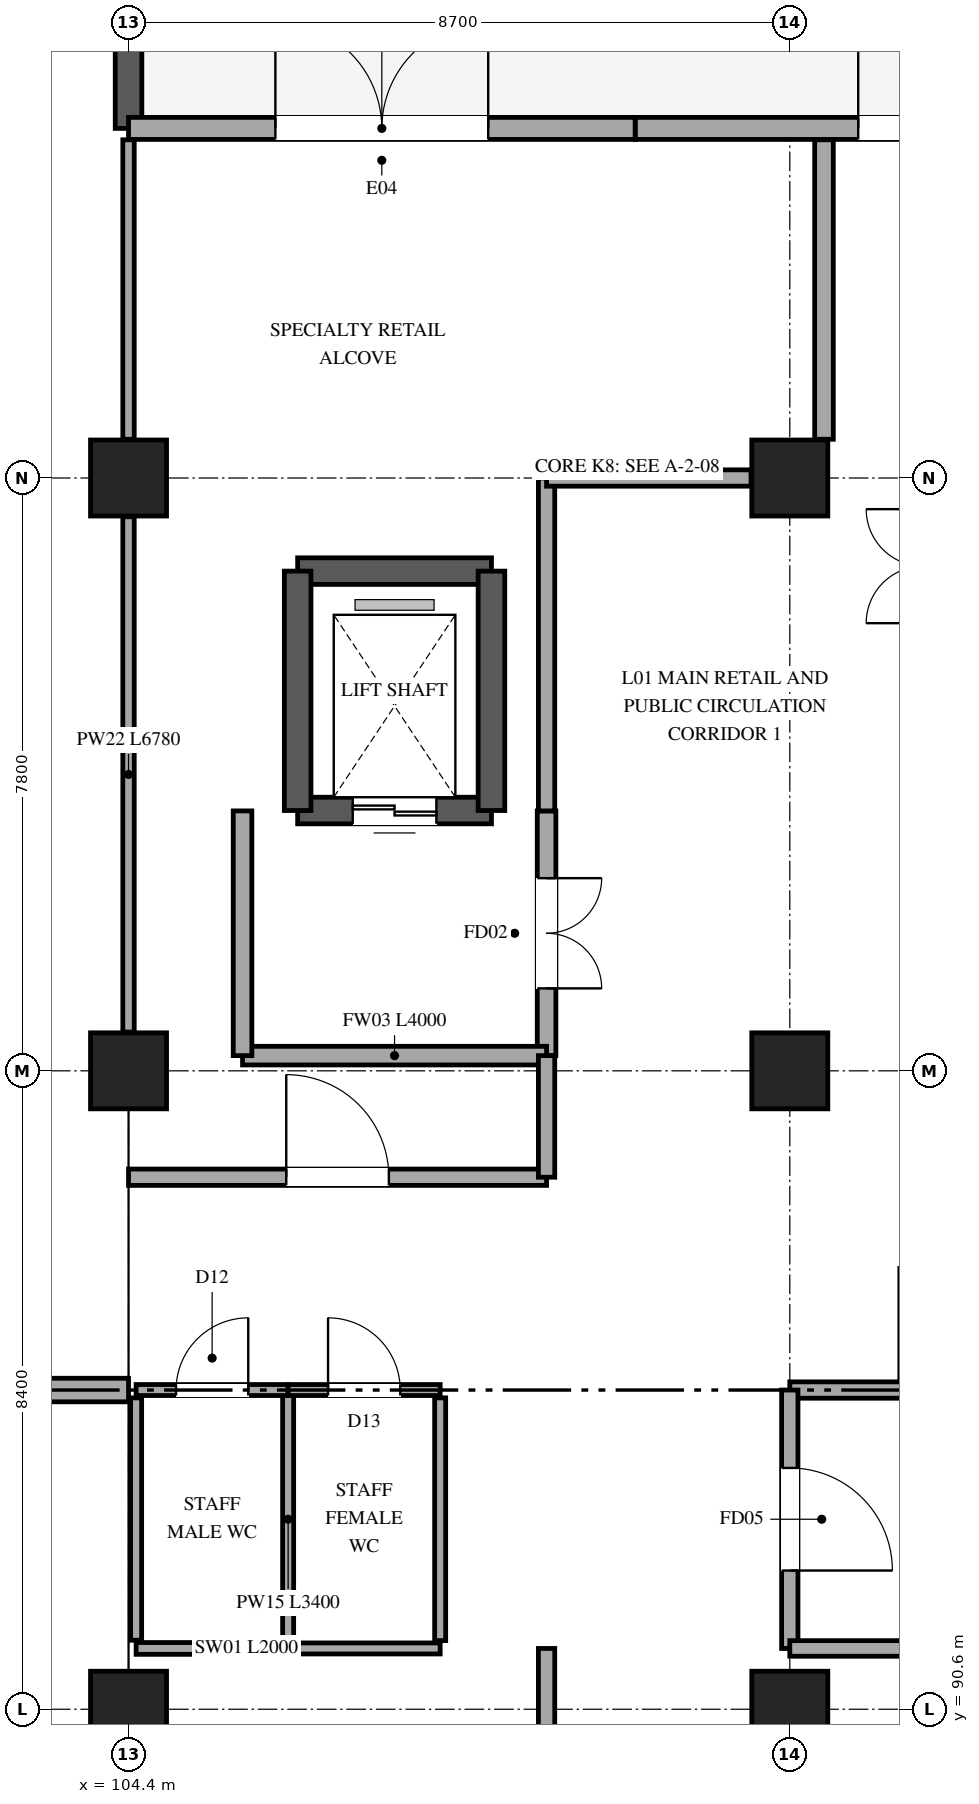
"""IFC4 building model, lengths in metres.
Left out: names, types, materials, properties, quantities, classifications, styles, units other than length and angle.
Written with IfcOpenShell. Run it as: python <this file> out.ifc"""

import sys

from ifc_helpers import new_model, si_unit, direction, frame, frame_2d, origin, origin_2d, place, context, subcontext, project, spatial, rectangle, extrude, element, fill, save


model = new_model("IFC4")
c1 = context("Model", 3, precision=1e-05, world=origin(), true_north=direction((0.0, 1.0)))
c2 = subcontext(c1, "Body", "Model", "MODEL_VIEW")
j1 = project(units=[si_unit("LENGTHUNIT", "METRE"), si_unit("PLANEANGLEUNIT", "RADIAN")], contexts=[c1])
p1 = place(None, origin())
s1 = spatial("IfcSite", under=j1, at=p1, CompositionType="ELEMENT")
p2 = place(p1, origin())
s2 = spatial("IfcBuilding", under=s1, at=p2, CompositionType="ELEMENT")
p3 = place(p2, origin())
s3 = spatial("IfcBuildingStorey", under=s2, at=p3, CompositionType="ELEMENT", Elevation=0.0)
for number, where, z_axis, x_axis in (
    (1, (104.4, 90.6, 0.0), (0.0, 0.0, 1.0), (1.0, 0.0, 0.0)),
    (2, (104.4, 99.0, 0.0), (0.0, 0.0, 1.0), (1.0, 0.0, 0.0)),
    (3, (104.4, 106.8, 0.0), (0.0, 0.0, 1.0), (1.0, 0.0, 0.0)),
    (4, (113.1, 90.6, 0.0), (0.0, 0.0, 1.0), (1.0, 0.0, 0.0)),
    (5, (113.1, 99.0, 0.0), (0.0, 0.0, 1.0), (1.0, 0.0, 0.0)),
    (6, (113.1, 106.8, 0.0), (0.0, 0.0, 1.0), (1.0, 0.0, 0.0)),
):
    element("IfcColumn", number, at=place(p3, frame(where, z_axis=z_axis, x_axis=x_axis)), inside=s3, PredefinedType="COLUMN", context=c2, shape_type="SweptSolid", body=[
        extrude(rectangle(XDim=1.0, YDim=1.0, at=origin_2d()), origin(), (0.0, 0.0, 1.0), 6.0),
    ])
p4 = place(p3, frame((104.4, 114.148, 0.0), z_axis=(0.0, 0.0, 1.0), x_axis=(0.0, -1.0, 0.0)))
e7 = element("IfcWall", 7, at=p4, inside=s3, PredefinedType="STANDARD", context=c2, shape_type="SweptSolid", body=[
    extrude(rectangle(XDim=2.748, YDim=0.35, at=frame_2d((1.374, 0.0))), origin(), (0.0, 0.0, 1.0), 5.66),
])
p5 = place(p3, frame((104.4, 111.4, 0.0), z_axis=(0.0, 0.0, 1.0), x_axis=(1.0, 0.0, 0.0)))
e8 = element("IfcWall", 8, at=p5, inside=s3, PredefinedType="STANDARD", context=c2, shape_type="SweptSolid", body=[
    extrude(rectangle(XDim=6.665, YDim=0.29, at=frame_2d((3.333, 0.0))), origin(), (0.0, 0.0, 1.0), 4.875),
])
p6 = place(p5, frame((1.932, 0.0, 0.0)))
e9 = element("IfcOpeningElement", 9, at=p6, cuts=e8, PredefinedType="OPENING", context=c2, shape_type="SweptSolid", body=[
    extrude(rectangle(XDim=2.8, YDim=2.5, at=frame_2d((1.4, 1.25))), frame((0.0, 0.155, 0.0), z_axis=(0.0, -1.0, 0.0), x_axis=(1.0, 0.0, 0.0)), (0.0, 0.0, 1.0), 0.31),
])
p7 = place(p3, frame((111.069, 111.4, 0.0), z_axis=(0.0, 0.0, 1.0), x_axis=(1.0, 0.0, 0.0)))
e10 = element("IfcWall", 10, at=p7, inside=s3, PredefinedType="STANDARD", context=c2, shape_type="SweptSolid", body=[
    extrude(rectangle(XDim=6.662, YDim=0.29, at=frame_2d((3.331, 0.0))), origin(), (0.0, 0.0, 1.0), 4.92),
])
p8 = place(p7, frame((2.931, 0.0, 0.0)))
e11 = element("IfcOpeningElement", 11, at=p8, cuts=e10, PredefinedType="OPENING", context=c2, shape_type="SweptSolid", body=[
    extrude(rectangle(XDim=3.2, YDim=2.4, at=frame_2d((1.6, 1.2))), frame((0.0, 0.155, 0.0), z_axis=(0.0, -1.0, 0.0), x_axis=(1.0, 0.0, 0.0)), (0.0, 0.0, 1.0), 0.31),
])
p9 = place(p3, frame((106.625, 105.575, 0.0), z_axis=(0.0, 0.0, 1.0), x_axis=(1.0, 0.0, 0.0)))
e12 = element("IfcWall", 12, at=p9, inside=s3, PredefinedType="SHEAR", context=c2, shape_type="SweptSolid", body=[
    extrude(rectangle(XDim=2.55, YDim=0.35, at=frame_2d((1.275, 0.0))), origin(), (0.0, 0.0, 1.0), 6.0),
])
p10 = place(p3, frame((109.175, 102.425, 0.0), z_axis=(0.0, 0.0, 1.0), x_axis=(-1.0, 0.0, 0.0)))
e13 = element("IfcWall", 13, at=p10, inside=s3, PredefinedType="SHEAR", context=c2, shape_type="SweptSolid", body=[
    extrude(rectangle(XDim=2.55, YDim=0.35, at=frame_2d((1.275, 0.0))), origin(), (0.0, 0.0, 1.0), 6.0),
])
p11 = place(p10, frame((0.725, 0.0, 0.0)))
e14 = element("IfcOpeningElement", 14, at=p11, cuts=e13, PredefinedType="OPENING", context=c2, shape_type="SweptSolid", body=[
    extrude(rectangle(XDim=1.1, YDim=2.2, at=frame_2d((0.55, 1.1))), frame((0.0, 0.185, 0.0), z_axis=(0.0, -1.0, 0.0), x_axis=(1.0, 0.0, 0.0)), (0.0, 0.0, 1.0), 0.37),
])
for number, where, z_axis, x_axis in (
    (15, (106.625, 102.425, 0.0), (0.0, 0.0, 1.0), (0.0, 1.0, 0.0)),
    (16, (109.175, 105.575, 0.0), (0.0, 0.0, 1.0), (0.0, -1.0, 0.0)),
):
    element("IfcWall", number, at=place(p3, frame(where, z_axis=z_axis, x_axis=x_axis)), inside=s3, PredefinedType="SHEAR", context=c2, shape_type="SweptSolid", body=[
        extrude(rectangle(XDim=3.15, YDim=0.35, at=frame_2d((1.575, 0.0))), origin(), (0.0, 0.0, 1.0), 6.0),
    ])
p12 = place(p3, frame((109.9, 102.42, 0.0), z_axis=(0.0, 0.0, 1.0), x_axis=(0.0, -1.0, 0.0)))
e17 = element("IfcWall", 17, at=p12, inside=s3, PredefinedType="STANDARD", context=c2, shape_type="SweptSolid", body=[
    extrude(rectangle(XDim=3.22, YDim=0.245, at=frame_2d((1.61, 0.0))), origin(), (0.0, 0.0, 1.0), 4.925),
])
p13 = place(p12, frame((0.885, 0.0, 0.0)))
e18 = element("IfcOpeningElement", 18, at=p13, cuts=e17, PredefinedType="OPENING", context=c2, shape_type="SweptSolid", body=[
    extrude(rectangle(XDim=1.45, YDim=2.2, at=frame_2d((0.725, 1.1))), frame((0.0, 0.133, 0.0), z_axis=(0.0, -1.0, 0.0), x_axis=(1.0, 0.0, 0.0)), (0.0, 0.0, 1.0), 0.265),
])
p14 = place(p3, frame((109.9, 99.2, 0.0), z_axis=(0.0, 0.0, 1.0), x_axis=(-1.0, 0.0, 0.0)))
e19 = element("IfcWall", 19, at=p14, inside=s3, PredefinedType="STANDARD", context=c2, shape_type="SweptSolid", body=[
    extrude(rectangle(XDim=4.0, YDim=0.245, at=frame_2d((2.0, 0.0))), origin(), (0.0, 0.0, 1.0), 4.925),
])
p15 = place(p3, frame((105.9, 99.2, 0.0), z_axis=(0.0, 0.0, 1.0), x_axis=(0.0, 1.0, 0.0)))
e20 = element("IfcWall", 20, at=p15, inside=s3, PredefinedType="STANDARD", context=c2, shape_type="SweptSolid", body=[
    extrude(rectangle(XDim=3.22, YDim=0.245, at=frame_2d((1.61, 0.0))), origin(), (0.0, 0.0, 1.0), 4.925),
])
p16 = place(p3, frame((113.55, 107.31, 0.0), z_axis=(0.0, 0.0, 1.0), x_axis=(0.0, 1.0, 0.0)))
e21 = element("IfcWall", 21, at=p16, inside=s3, PredefinedType="STANDARD", context=c2, shape_type="SweptSolid", body=[
    extrude(rectangle(XDim=3.94, YDim=0.245, at=frame_2d((1.97, 0.0))), origin(), (0.0, 0.0, 1.0), 5.66),
])
p17 = place(p3, frame((106.5, 94.8, 0.0), z_axis=(0.0, 0.0, 1.0), x_axis=(0.0, -1.0, 0.0)))
e22 = element("IfcWall", 22, at=p17, inside=s3, PredefinedType="PARTITIONING", context=c2, shape_type="SweptSolid", body=[
    extrude(rectangle(XDim=3.4, YDim=0.145, at=frame_2d((1.7, 0.0))), origin(), (0.0, 0.0, 1.0), 5.66),
])
p18 = place(p3, frame((104.5, 94.8, 0.0), z_axis=(0.0, 0.0, 1.0), x_axis=(1.0, 0.0, 0.0)))
e23 = element("IfcWall", 23, at=p18, inside=s3, PredefinedType="PARTITIONING", context=c2, shape_type="SweptSolid", body=[
    extrude(rectangle(XDim=2.0, YDim=0.145, at=frame_2d((1.0, 0.0))), origin(), (0.0, 0.0, 1.0), 4.88),
])
p19 = place(p18, frame((0.525, 0.0, 0.0)))
e24 = element("IfcOpeningElement", 24, at=p19, cuts=e23, PredefinedType="OPENING", context=c2, shape_type="SweptSolid", body=[
    extrude(rectangle(XDim=0.95, YDim=2.15, at=frame_2d((0.475, 1.075))), frame((0.0, 0.083, 0.0), z_axis=(0.0, -1.0, 0.0), x_axis=(1.0, 0.0, 0.0)), (0.0, 0.0, 1.0), 0.165),
])
p20 = place(p3, frame((106.5, 91.4, 0.0), z_axis=(0.0, 0.0, 1.0), x_axis=(-1.0, 0.0, 0.0)))
e25 = element("IfcWall", 25, at=p20, inside=s3, PredefinedType="MOVABLE", context=c2, shape_type="SweptSolid", body=[
    extrude(rectangle(XDim=2.0, YDim=0.155, at=frame_2d((1.0, 0.0))), origin(), (0.0, 0.0, 1.0), 4.88),
])
p21 = place(p3, frame((106.5, 94.8, 0.0), z_axis=(0.0, 0.0, 1.0), x_axis=(1.0, 0.0, 0.0)))
e26 = element("IfcWall", 26, at=p21, inside=s3, PredefinedType="PARTITIONING", context=c2, shape_type="SweptSolid", body=[
    extrude(rectangle(XDim=2.0, YDim=0.145, at=frame_2d((1.0, 0.0))), origin(), (0.0, 0.0, 1.0), 5.66),
])
p22 = place(p21, frame((0.525, 0.0, 0.0)))
e27 = element("IfcOpeningElement", 27, at=p22, cuts=e26, PredefinedType="OPENING", context=c2, shape_type="SweptSolid", body=[
    extrude(rectangle(XDim=0.95, YDim=2.2, at=frame_2d((0.475, 1.1))), frame((0.0, 0.083, 0.0), z_axis=(0.0, -1.0, 0.0), x_axis=(1.0, 0.0, 0.0)), (0.0, 0.0, 1.0), 0.165),
])
p23 = place(p3, frame((108.5, 91.4, 0.0), z_axis=(0.0, 0.0, 1.0), x_axis=(-1.0, 0.0, 0.0)))
e28 = element("IfcWall", 28, at=p23, inside=s3, PredefinedType="PARTITIONING", context=c2, shape_type="SweptSolid", body=[
    extrude(rectangle(XDim=2.0, YDim=0.145, at=frame_2d((1.0, 0.0))), origin(), (0.0, 0.0, 1.0), 5.66),
])
p24 = place(p3, frame((104.4, 94.8, 0.0), z_axis=(0.0, 0.0, 1.0), x_axis=(-1.0, 0.0, 0.0)))
e29 = element("IfcWall", 29, at=p24, inside=s3, PredefinedType="STANDARD", context=c2, shape_type="SweptSolid", body=[
    extrude(rectangle(XDim=12.8, YDim=0.31, at=frame_2d((6.4, 0.0))), origin(), (0.0, 0.0, 1.0), 4.88),
])
p25 = place(p3, frame((109.9, 80.7, 0.0), z_axis=(0.0, 0.0, 1.0), x_axis=(0.0, 1.0, 0.0)))
e30 = element("IfcWall", 30, at=p25, inside=s3, PredefinedType="PARTITIONING", context=c2, shape_type="SweptSolid", body=[
    extrude(rectangle(XDim=10.7, YDim=0.215, at=frame_2d((5.35, 0.0))), origin(), (0.0, 0.0, 1.0), 4.925),
])
p26 = place(p25, frame((4.675, 0.0, 0.0)))
e31 = element("IfcOpeningElement", 31, at=p26, cuts=e30, PredefinedType="OPENING", context=c2, shape_type="SweptSolid", body=[
    extrude(rectangle(XDim=1.35, YDim=2.2, at=frame_2d((0.675, 1.1))), frame((0.0, 0.118, 0.0), z_axis=(0.0, -1.0, 0.0), x_axis=(1.0, 0.0, 0.0)), (0.0, 0.0, 1.0), 0.235),
])
p27 = place(p3, frame((114.655, 96.4, 0.0), z_axis=(0.0, 0.0, 1.0), x_axis=(0.0, -1.0, 0.0)))
e32 = element("IfcWall", 32, at=p27, inside=s3, PredefinedType="PARTITIONING", context=c2, shape_type="SweptSolid", body=[
    extrude(rectangle(XDim=1.6, YDim=0.215, at=frame_2d((0.8, 0.0))), origin(), (0.0, 0.0, 1.0), 5.66),
])
p28 = place(p3, frame((114.655, 94.8, 0.0), z_axis=(0.0, 0.0, 1.0), x_axis=(-1.0, 0.0, 0.0)))
e33 = element("IfcWall", 33, at=p28, inside=s3, PredefinedType="PARTITIONING", context=c2, shape_type="SweptSolid", body=[
    extrude(rectangle(XDim=1.555, YDim=0.215, at=frame_2d((0.777, 0.0))), origin(), (0.0, 0.0, 1.0), 4.925),
])
p29 = place(p3, frame((113.1, 94.8, 0.0), z_axis=(0.0, 0.0, 1.0), x_axis=(0.0, -1.0, 0.0)))
e34 = element("IfcWall", 34, at=p29, inside=s3, PredefinedType="PARTITIONING", context=c2, shape_type="SweptSolid", body=[
    extrude(rectangle(XDim=3.4, YDim=0.215, at=frame_2d((1.7, 0.0))), origin(), (0.0, 0.0, 1.0), 4.925),
])
p30 = place(p29, frame((1.025, 0.0, 0.0)))
e35 = element("IfcOpeningElement", 35, at=p30, cuts=e34, PredefinedType="OPENING", context=c2, shape_type="SweptSolid", body=[
    extrude(rectangle(XDim=1.35, YDim=2.2, at=frame_2d((0.675, 1.1))), frame((0.0, 0.118, 0.0), z_axis=(0.0, -1.0, 0.0), x_axis=(1.0, 0.0, 0.0)), (0.0, 0.0, 1.0), 0.235),
])
p31 = place(p3, frame((104.4, 97.6, 0.0), z_axis=(0.0, 0.0, 1.0), x_axis=(1.0, 0.0, 0.0)))
e36 = element("IfcWall", 36, at=p31, inside=s3, PredefinedType="PARTITIONING", context=c2, shape_type="SweptSolid", body=[
    extrude(rectangle(XDim=5.5, YDim=0.215, at=frame_2d((2.75, 0.0))), origin(), (0.0, 0.0, 1.0), 4.88),
])
p32 = place(p31, frame((2.075, 0.0, 0.0)))
e37 = element("IfcOpeningElement", 37, at=p32, cuts=e36, PredefinedType="OPENING", context=c2, shape_type="SweptSolid", body=[
    extrude(rectangle(XDim=1.35, YDim=2.2, at=frame_2d((0.675, 1.1))), frame((0.0, 0.118, 0.0), z_axis=(0.0, -1.0, 0.0), x_axis=(1.0, 0.0, 0.0)), (0.0, 0.0, 1.0), 0.235),
])
p33 = place(p3, frame((109.9, 97.6, 0.0), z_axis=(0.0, 0.0, 1.0), x_axis=(0.0, 1.0, 0.0)))
e38 = element("IfcWall", 38, at=p33, inside=s3, PredefinedType="PARTITIONING", context=c2, shape_type="SweptSolid", body=[
    extrude(rectangle(XDim=1.6, YDim=0.215, at=frame_2d((0.8, 0.0))), origin(), (0.0, 0.0, 1.0), 4.925),
])
p34 = place(p3, frame((109.9, 102.42, 0.0), z_axis=(0.0, 0.0, 1.0), x_axis=(0.0, 1.0, 0.0)))
e39 = element("IfcWall", 39, at=p34, inside=s3, PredefinedType="PARTITIONING", context=c2, shape_type="SweptSolid", body=[
    extrude(rectangle(XDim=4.38, YDim=0.215, at=frame_2d((2.19, 0.0))), origin(), (0.0, 0.0, 1.0), 4.925),
])
p35 = place(p3, frame((109.9, 106.8, 0.0), z_axis=(0.0, 0.0, 1.0), x_axis=(1.0, 0.0, 0.0)))
e40 = element("IfcWall", 40, at=p35, inside=s3, PredefinedType="PARTITIONING", context=c2, shape_type="SweptSolid", body=[
    extrude(rectangle(XDim=2.69, YDim=0.215, at=frame_2d((1.345, 0.0))), origin(), (0.0, 0.0, 1.0), 4.925),
])
p36 = place(p3, frame((104.4, 111.25, 0.0), z_axis=(0.0, 0.0, 1.0), x_axis=(0.0, -1.0, 0.0)))
e41 = element("IfcWall", 41, at=p36, inside=s3, PredefinedType="PARTITIONING", context=c2, shape_type="SweptSolid", body=[
    extrude(rectangle(XDim=3.94, YDim=0.15, at=frame_2d((1.97, 0.0))), origin(), (0.0, 0.0, 1.0), 4.88),
])
p37 = place(p3, frame((104.4, 106.29, 0.0), z_axis=(0.0, 0.0, 1.0), x_axis=(0.0, -1.0, 0.0)))
e42 = element("IfcWall", 42, at=p37, inside=s3, PredefinedType="PARTITIONING", context=c2, shape_type="SweptSolid", body=[
    extrude(rectangle(XDim=6.78, YDim=0.15, at=frame_2d((3.39, 0.0))), origin(), (0.0, 0.0, 1.0), 4.88),
])
p38 = place(p3, frame((113.1, 91.4, 0.0), z_axis=(0.0, 0.0, 1.0), x_axis=(1.0, 0.0, 0.0)))
e43 = element("IfcWall", 43, at=p38, inside=s3, PredefinedType="PARTITIONING", context=c2, shape_type="SweptSolid", body=[
    extrude(rectangle(XDim=10.9, YDim=0.205, at=frame_2d((5.45, 0.0))), origin(), (0.0, 0.0, 1.0), 4.925),
])
p39 = place(p3, frame((104.5, 91.508, 0.0), z_axis=(0.0, 0.0, 1.0), x_axis=(0.0, 1.0, 0.0)))
e44 = element("IfcWall", 44, at=p39, inside=s3, PredefinedType="PARTITIONING", context=c2, shape_type="SweptSolid", body=[
    extrude(rectangle(XDim=3.189, YDim=0.145, at=frame_2d((1.594, 0.0))), origin(), (0.0, 0.0, 1.0), 4.88),
])
p40 = place(p3, frame((108.5, 94.697, 0.0), z_axis=(0.0, 0.0, 1.0), x_axis=(0.0, -1.0, 0.0)))
e45 = element("IfcWall", 45, at=p40, inside=s3, PredefinedType="PARTITIONING", context=c2, shape_type="SweptSolid", body=[
    extrude(rectangle(XDim=3.194, YDim=0.145, at=frame_2d((1.597, 0.0))), origin(), (0.0, 0.0, 1.0), 5.66),
])
p41 = place(p6, origin())
e46 = element("IfcDoor", 46, at=p41, inside=s3, OperationType="DOUBLE_DOOR_SINGLE_SWING", PredefinedType="DOOR", context=c2, shape_type="SweptSolid", body=[
    extrude(rectangle(XDim=2.8, YDim=2.5, at=frame_2d((1.4, 1.25))), frame((0.0, 0.025, 0.0), z_axis=(0.0, -1.0, 0.0), x_axis=(1.0, 0.0, 0.0)), (0.0, 0.0, 1.0), 0.05),
])
fill(e9, e46)
p42 = place(p8, origin())
e47 = element("IfcDoor", 47, at=p42, inside=s3, OperationType="DOUBLE_DOOR_SINGLE_SWING", PredefinedType="USERDEFINED", context=c2, shape_type="SweptSolid", body=[
    extrude(rectangle(XDim=3.2, YDim=2.4, at=frame_2d((1.6, 1.2))), frame((0.0, 0.025, 0.0), z_axis=(0.0, -1.0, 0.0), x_axis=(1.0, 0.0, 0.0)), (0.0, 0.0, 1.0), 0.05),
])
fill(e11, e47)
p43 = place(p11, origin())
e48 = element("IfcDoor", 48, at=p43, inside=s3, OperationType="DOUBLE_DOOR_SLIDING", PredefinedType="DOOR", context=c2, shape_type="SweptSolid", body=[
    extrude(rectangle(XDim=1.1, YDim=2.2, at=frame_2d((0.55, 1.1))), frame((0.0, 0.025, 0.0), z_axis=(0.0, -1.0, 0.0), x_axis=(1.0, 0.0, 0.0)), (0.0, 0.0, 1.0), 0.05),
])
fill(e14, e48)
p44 = place(p13, origin())
e49 = element("IfcDoor", 49, at=p44, inside=s3, OperationType="DOUBLE_DOOR_SINGLE_SWING", PredefinedType="DOOR", context=c2, shape_type="SweptSolid", body=[
    extrude(rectangle(XDim=1.45, YDim=2.2, at=frame_2d((0.725, 1.1))), frame((0.0, 0.025, 0.0), z_axis=(0.0, -1.0, 0.0), x_axis=(1.0, 0.0, 0.0)), (0.0, 0.0, 1.0), 0.05),
])
fill(e18, e49)
p45 = place(p19, origin())
e50 = element("IfcDoor", 50, at=p45, inside=s3, OperationType="SINGLE_SWING_RIGHT", PredefinedType="DOOR", context=c2, shape_type="SweptSolid", body=[
    extrude(rectangle(XDim=0.95, YDim=2.15, at=frame_2d((0.475, 1.075))), frame((0.0, 0.025, 0.0), z_axis=(0.0, -1.0, 0.0), x_axis=(1.0, 0.0, 0.0)), (0.0, 0.0, 1.0), 0.05),
])
fill(e24, e50)
p46 = place(p22, origin())
e51 = element("IfcDoor", 51, at=p46, inside=s3, OperationType="SINGLE_SWING_LEFT", PredefinedType="DOOR", context=c2, shape_type="SweptSolid", body=[
    extrude(rectangle(XDim=0.95, YDim=2.2, at=frame_2d((0.475, 1.1))), frame((0.0, 0.025, 0.0), z_axis=(0.0, -1.0, 0.0), x_axis=(1.0, 0.0, 0.0)), (0.0, 0.0, 1.0), 0.05),
])
fill(e27, e51)
p47 = place(p30, origin())
e52 = element("IfcDoor", 52, at=p47, inside=s3, OperationType="SINGLE_SWING_RIGHT", PredefinedType="DOOR", context=c2, shape_type="SweptSolid", body=[
    extrude(rectangle(XDim=1.35, YDim=2.2, at=frame_2d((0.675, 1.1))), frame((0.0, 0.025, 0.0), z_axis=(0.0, -1.0, 0.0), x_axis=(1.0, 0.0, 0.0)), (0.0, 0.0, 1.0), 0.05),
])
fill(e35, e52)
p48 = place(p32, origin())
e53 = element("IfcDoor", 53, at=p48, inside=s3, OperationType="SINGLE_SWING_LEFT", PredefinedType="DOOR", context=c2, shape_type="SweptSolid", body=[
    extrude(rectangle(XDim=1.35, YDim=2.2, at=frame_2d((0.675, 1.1))), frame((0.0, 0.025, 0.0), z_axis=(0.0, -1.0, 0.0), x_axis=(1.0, 0.0, 0.0)), (0.0, 0.0, 1.0), 0.05),
])
fill(e37, e53)
save(model, sys.argv[1])
